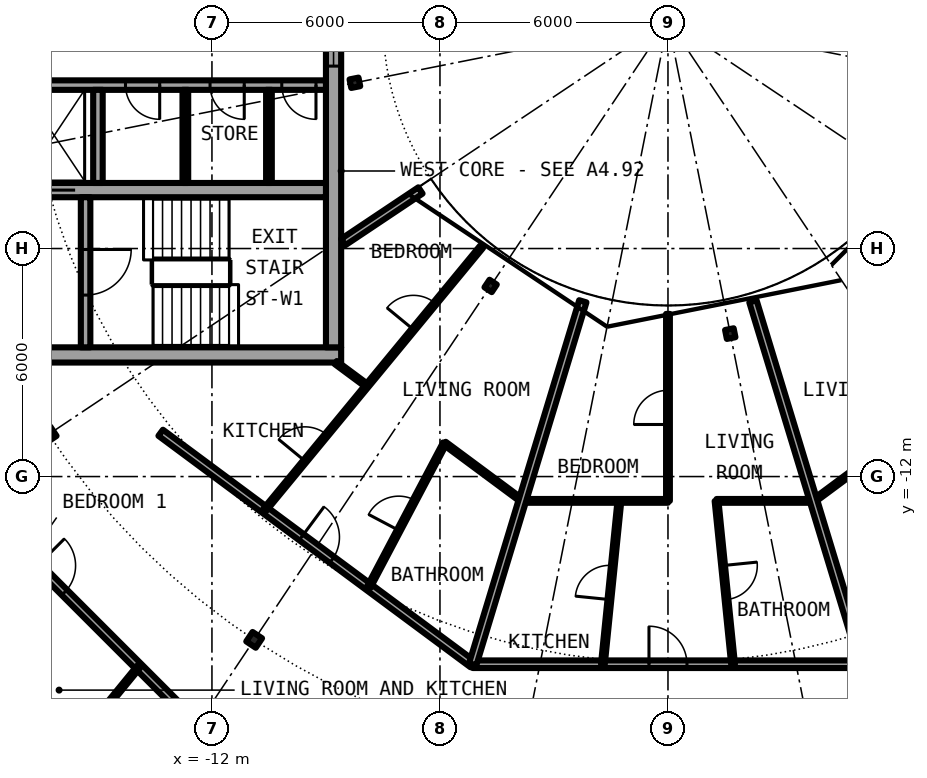
"""IFC4 building model, lengths in metres.
Left out: names, types, materials, properties, quantities, classifications, styles, units other than length and angle.
Written with IfcOpenShell. Run it as: python <this file> out.ifc"""

import sys

from ifc_helpers import new_model, si_unit, direction, frame, frame_2d, origin, origin_2d, place, context, subcontext, project, spatial, rectangle, i_section, extrude, element, fill, save


model = new_model("IFC4")
c1 = context("Model", 3, precision=1e-05, world=origin(), true_north=direction((0.0, 1.0)))
c2 = subcontext(c1, "Body", "Model", "MODEL_VIEW")
j1 = project(units=[si_unit("LENGTHUNIT", "METRE"), si_unit("PLANEANGLEUNIT", "RADIAN")], contexts=[c1])
p1 = place(None, origin())
s1 = spatial("IfcSite", under=j1, at=p1, CompositionType="ELEMENT")
p2 = place(p1, origin())
s2 = spatial("IfcBuilding", under=s1, at=p2, CompositionType="ELEMENT")
p3 = place(p2, frame((0.0, 0.0, 234.05)))
s3 = spatial("IfcBuildingStorey", under=s2, at=p3, CompositionType="ELEMENT", Elevation=234.05)
for number, where, z_axis, x_axis in (
    (1, (-16.297, -10.889, 0.0), (0.0, 0.0, 1.0), (-0.831, -0.556, 0.0)),
    (2, (-10.889, -16.297, 0.0), (0.0, 0.0, 1.0), (-0.556, -0.831, 0.0)),
):
    element("IfcColumn", number, at=place(p3, frame(where, z_axis=z_axis, x_axis=x_axis)), inside=s3, PredefinedType="COLUMN", context=c2, shape_type="SweptSolid", body=[
        extrude(i_section(OverallWidth=0.3, OverallDepth=0.3, WebThickness=0.011, FlangeThickness=0.019, FilletRadius=0.027, at=origin_2d()), origin(), (0.0, 0.0, 1.0), 3.05),
    ])
for number, where, z_axis, x_axis in (
    (3, (-8.239, -1.639, 0.0), (0.0, 0.0, 1.0), (-0.981, -0.195, 0.0)),
    (4, (-4.667, -6.984, 0.0), (0.0, 0.0, 1.0), (-0.556, -0.831, 0.0)),
    (5, (1.639, -8.239, 0.0), (0.0, 0.0, 1.0), (0.195, -0.981, 0.0)),
):
    element("IfcColumn", number, at=place(p3, frame(where, z_axis=z_axis, x_axis=x_axis)), inside=s3, PredefinedType="COLUMN", context=c2, shape_type="SweptSolid", body=[
        extrude(i_section(OverallWidth=0.24, OverallDepth=0.23, WebThickness=0.008, FlangeThickness=0.012, FilletRadius=0.021, at=origin_2d()), origin(), (0.0, 0.0, 1.0), 3.05),
    ])
p4 = place(p3, frame((-22.0, -8.8, 0.0), z_axis=(0.0, 0.0, 1.0), x_axis=(1.0, 0.0, 0.0)))
e6 = element("IfcWall", 6, at=p4, inside=s3, PredefinedType="SHEAR", context=c2, shape_type="SweptSolid", body=[
    extrude(rectangle(XDim=13.4, YDim=0.4, at=frame_2d((6.7, 0.0))), origin(), (0.0, 0.0, 1.0), 3.05),
])
p5 = place(p4, frame((0.925, 0.0, 0.0)))
e7 = element("IfcOpeningElement", 7, at=p5, cuts=e6, PredefinedType="OPENING", context=c2, shape_type="SweptSolid", body=[
    extrude(rectangle(XDim=1.2, YDim=2.3, at=frame_2d((0.6, 1.15))), frame((0.0, 0.21, 0.0), z_axis=(0.0, -1.0, 0.0), x_axis=(1.0, 0.0, 0.0)), (0.0, 0.0, 1.0), 0.42),
])
p6 = place(p3, frame((-8.8, 8.6, 0.0), z_axis=(0.0, 0.0, 1.0), x_axis=(0.0, -1.0, 0.0)))
e8 = element("IfcWall", 8, at=p6, inside=s3, PredefinedType="SHEAR", context=c2, shape_type="SweptSolid", body=[
    extrude(rectangle(XDim=17.2, YDim=0.4, at=frame_2d((8.6, 0.0))), origin(), (0.0, 0.0, 1.0), 3.05),
])
p7 = place(p6, frame((7.4, 0.0, 0.1)))
e9 = element("IfcOpeningElement", 9, at=p7, cuts=e8, PredefinedType="OPENING", context=c2, shape_type="SweptSolid", body=[
    extrude(rectangle(XDim=2.4, YDim=2.2, at=frame_2d((1.2, 1.1))), frame((0.0, 0.21, 0.0), z_axis=(0.0, -1.0, 0.0), x_axis=(1.0, 0.0, 0.0)), (0.0, 0.0, 1.0), 0.42),
])
p8 = place(p3, frame((-9.0, -1.7, 0.0), z_axis=(0.0, 0.0, 1.0), x_axis=(-1.0, 0.0, 0.0)))
e10 = element("IfcWall", 10, at=p8, inside=s3, PredefinedType="SHEAR", context=c2, shape_type="SweptSolid", body=[
    extrude(rectangle(XDim=10.15, YDim=0.25, at=frame_2d((5.075, 0.0))), origin(), (0.0, 0.0, 1.0), 3.05),
])
p9 = place(p8, frame((0.262, 0.0, 0.0)))
e11 = element("IfcOpeningElement", 11, at=p9, cuts=e10, PredefinedType="OPENING", context=c2, shape_type="SweptSolid", body=[
    extrude(rectangle(XDim=0.9, YDim=2.3, at=frame_2d((0.45, 1.15))), frame((0.0, 0.135, 0.0), z_axis=(0.0, -1.0, 0.0), x_axis=(1.0, 0.0, 0.0)), (0.0, 0.0, 1.0), 0.27),
])
p10 = place(p8, frame((2.15, 0.0, 0.0)))
e12 = element("IfcOpeningElement", 12, at=p10, cuts=e10, PredefinedType="OPENING", context=c2, shape_type="SweptSolid", body=[
    extrude(rectangle(XDim=0.9, YDim=2.3, at=frame_2d((0.45, 1.15))), frame((0.0, 0.135, 0.0), z_axis=(0.0, -1.0, 0.0), x_axis=(1.0, 0.0, 0.0)), (0.0, 0.0, 1.0), 0.27),
])
p11 = place(p8, frame((4.375, 0.0, 0.0)))
e13 = element("IfcOpeningElement", 13, at=p11, cuts=e10, PredefinedType="OPENING", context=c2, shape_type="SweptSolid", body=[
    extrude(rectangle(XDim=0.9, YDim=2.3, at=frame_2d((0.45, 1.15))), frame((0.0, 0.135, 0.0), z_axis=(0.0, -1.0, 0.0), x_axis=(1.0, 0.0, 0.0)), (0.0, 0.0, 1.0), 0.27),
])
p12 = place(p8, frame((8.837, 0.0, 0.0)))
e14 = element("IfcOpeningElement", 14, at=p12, cuts=e10, PredefinedType="OPENING", context=c2, shape_type="SweptSolid", body=[
    extrude(rectangle(XDim=0.9, YDim=2.3, at=frame_2d((0.45, 1.15))), frame((0.0, 0.135, 0.0), z_axis=(0.0, -1.0, 0.0), x_axis=(1.0, 0.0, 0.0)), (0.0, 0.0, 1.0), 0.27),
])
p13 = place(p3, frame((-9.0, -4.462, 0.0), z_axis=(0.0, 0.0, 1.0), x_axis=(-1.0, 0.0, 0.0)))
e15 = element("IfcWall", 15, at=p13, inside=s3, PredefinedType="SHEAR", context=c2, shape_type="SweptSolid", body=[
    extrude(rectangle(XDim=10.15, YDim=0.375, at=frame_2d((5.075, 0.0))), origin(), (0.0, 0.0, 1.0), 3.05),
])
p14 = place(p13, frame((6.6, 0.0, 0.0)))
e16 = element("IfcOpeningElement", 16, at=p14, cuts=e15, PredefinedType="OPENING", context=c2, shape_type="SweptSolid", body=[
    extrude(rectangle(XDim=1.1, YDim=2.3, at=frame_2d((0.55, 1.15))), frame((0.0, 0.198, 0.0), z_axis=(0.0, -1.0, 0.0), x_axis=(1.0, 0.0, 0.0)), (0.0, 0.0, 1.0), 0.395),
])
p15 = place(p3, frame((-15.325, -4.65, 0.0), z_axis=(0.0, 0.0, 1.0), x_axis=(0.0, -1.0, 0.0)))
e17 = element("IfcWall", 17, at=p15, inside=s3, PredefinedType="SHEAR", context=c2, shape_type="SweptSolid", body=[
    extrude(rectangle(XDim=3.95, YDim=0.25, at=frame_2d((1.975, 0.0))), origin(), (0.0, 0.0, 1.0), 3.05),
])
p16 = place(p15, frame((1.375, 0.0, 0.0)))
e18 = element("IfcOpeningElement", 18, at=p16, cuts=e17, PredefinedType="OPENING", context=c2, shape_type="SweptSolid", body=[
    extrude(rectangle(XDim=1.2, YDim=2.3, at=frame_2d((0.6, 1.15))), frame((0.0, 0.135, 0.0), z_axis=(0.0, -1.0, 0.0), x_axis=(1.0, 0.0, 0.0)), (0.0, 0.0, 1.0), 0.27),
])
p17 = place(p3, frame((-15.0, -1.825, 0.0), z_axis=(0.0, 0.0, 1.0), x_axis=(0.0, -1.0, 0.0)))
e19 = element("IfcWall", 19, at=p17, inside=s3, PredefinedType="SOLIDWALL", context=c2, shape_type="SweptSolid", body=[
    extrude(rectangle(XDim=2.45, YDim=0.25, at=frame_2d((1.225, 0.0))), origin(), (0.0, 0.0, 1.0), 2.7),
])
for number, where, z_axis, x_axis in (
    (20, (-10.5, -1.825, 0.0), (0.0, 0.0, 1.0), (0.0, -1.0, 0.0)),
    (21, (-12.7, -1.825, 0.0), (0.0, 0.0, 1.0), (0.0, -1.0, 0.0)),
):
    element("IfcWall", number, at=place(p3, frame(where, z_axis=z_axis, x_axis=x_axis)), inside=s3, PredefinedType="PARTITIONING", context=c2, shape_type="SweptSolid", body=[
        extrude(rectangle(XDim=2.45, YDim=0.15, at=frame_2d((1.225, 0.0))), origin(), (0.0, 0.0, 1.0), 2.7),
    ])
p18 = place(p3, frame((-18.542, -12.389, 0.0), z_axis=(0.0, 0.0, 1.0), x_axis=(0.707106781187, -0.707106781187, 0.0)))
e22 = element("IfcWall", 22, at=p18, inside=s3, PredefinedType="PARTITIONING", context=c2, shape_type="SweptSolid", body=[
    extrude(rectangle(XDim=8.702, YDim=0.2, at=frame_2d((4.351, 0.0))), origin(), (0.0, 0.0, 1.0), 2.7),
])
p19 = place(p18, frame((2.763, 0.0, 0.0)))
e23 = element("IfcOpeningElement", 23, at=p19, cuts=e22, PredefinedType="OPENING", context=c2, shape_type="SweptSolid", body=[
    extrude(rectangle(XDim=1.0, YDim=2.3, at=frame_2d((0.5, 1.15))), frame((0.0, 0.11, 0.0), z_axis=(0.0, -1.0, 0.0), x_axis=(1.0, 0.0, 0.0)), (0.0, 0.0, 1.0), 0.22),
])
p20 = place(p3, frame((-5.138, -16.938, 0.0), z_axis=(0.0, 0.0, 1.0), x_axis=(1.0, 0.0, 0.0)))
e24 = element("IfcWall", 24, at=p20, inside=s3, PredefinedType="PARTITIONING", context=c2, shape_type="SweptSolid", body=[
    extrude(rectangle(XDim=10.276, YDim=0.2, at=frame_2d((5.138, 0.0))), origin(), (0.0, 0.0, 1.0), 2.7),
])
p21 = place(p20, frame((4.638, 0.0, 0.0)))
e25 = element("IfcOpeningElement", 25, at=p21, cuts=e24, PredefinedType="OPENING", context=c2, shape_type="SweptSolid", body=[
    extrude(rectangle(XDim=1.0, YDim=2.3, at=frame_2d((0.5, 1.15))), frame((0.0, 0.11, 0.0), z_axis=(0.0, -1.0, 0.0), x_axis=(1.0, 0.0, 0.0)), (0.0, 0.0, 1.0), 0.22),
])
p22 = place(p3, frame((-13.349, -10.848, 0.0), z_axis=(0.0, 0.0, 1.0), x_axis=(0.803229232922, -0.595670042371, 0.0)))
e26 = element("IfcWall", 26, at=p22, inside=s3, PredefinedType="PARTITIONING", context=c2, shape_type="SweptSolid", body=[
    extrude(rectangle(XDim=10.224, YDim=0.2, at=frame_2d((5.112, 0.0))), origin(), (0.0, 0.0, 1.0), 2.7),
])
p23 = place(p22, frame((4.612, 0.0, 0.0)))
e27 = element("IfcOpeningElement", 27, at=p23, cuts=e26, PredefinedType="OPENING", context=c2, shape_type="SweptSolid", body=[
    extrude(rectangle(XDim=1.0, YDim=2.3, at=frame_2d((0.5, 1.15))), frame((0.0, 0.11, 0.0), z_axis=(0.0, -1.0, 0.0), x_axis=(1.0, 0.0, 0.0)), (0.0, 0.0, 1.0), 0.22),
])
p24 = place(p3, frame((-3.834, -12.64, 0.0), z_axis=(0.0, 0.0, 1.0), x_axis=(1.0, 0.0, 0.0)))
e28 = element("IfcWall", 28, at=p24, inside=s3, PredefinedType="PARTITIONING", context=c2, shape_type="SweptSolid", body=[
    extrude(rectangle(XDim=3.834, YDim=0.1, at=frame_2d((1.917, 0.0))), origin(), (0.0, 0.0, 1.0), 2.7),
])
p25 = place(p3, frame((1.278, -12.64, 0.0), z_axis=(0.0, 0.0, 1.0), x_axis=(1.0, 0.0, 0.0)))
e29 = element("IfcWall", 29, at=p25, inside=s3, PredefinedType="PARTITIONING", context=c2, shape_type="SweptSolid", body=[
    extrude(rectangle(XDim=2.556, YDim=0.1, at=frame_2d((1.278, 0.0))), origin(), (0.0, 0.0, 1.0), 2.7),
])
p26 = place(p3, frame((-8.743, -9.0, 0.0), z_axis=(0.0, 0.0, 1.0), x_axis=(0.80321556998, -0.595688465677, 0.0)))
e30 = element("IfcWall", 30, at=p26, inside=s3, PredefinedType="PARTITIONING", context=c2, shape_type="SweptSolid", body=[
    extrude(rectangle(XDim=1.026, YDim=0.1, at=frame_2d((0.513, 0.0))), origin(), (0.0, 0.0, 1.0), 2.7),
])
for number, where, z_axis, x_axis in (
    (31, (-5.877, -11.125, 0.0), (0.0, 0.0, 1.0), (0.803, -0.596, 0.0)),
    (32, (3.834, -12.64, 0.0), (0.0, 0.0, 1.0), (0.803, 0.596, 0.0)),
):
    element("IfcWall", number, at=place(p3, frame(where, z_axis=z_axis, x_axis=x_axis)), inside=s3, PredefinedType="PARTITIONING", context=c2, shape_type="SweptSolid", body=[
        extrude(rectangle(XDim=2.543, YDim=0.1, at=frame_2d((1.272, 0.0))), origin(), (0.0, 0.0, 1.0), 2.7),
    ])
p27 = place(p3, frame((-6.513, -4.472, 0.0), z_axis=(0.0, 0.0, 1.0), x_axis=(-0.831450132577, -0.555599385382, 0.0)))
e33 = element("IfcWall", 33, at=p27, inside=s3, PredefinedType="PARTITIONING", context=c2, shape_type="SweptSolid", body=[
    extrude(rectangle(XDim=2.443, YDim=0.2, at=frame_2d((1.221, 0.0))), origin(), (0.0, 0.0, 1.0), 2.7),
])
p28 = place(p3, frame((-14.927, -18.224, 0.0), z_axis=(0.0, 0.0, 1.0), x_axis=(0.633861186344, 0.773446828454, 0.0)))
e34 = element("IfcWall", 34, at=p28, inside=s3, PredefinedType="PARTITIONING", context=c2, shape_type="SweptSolid", body=[
    extrude(rectangle(XDim=1.578, YDim=0.1, at=frame_2d((0.789, 0.0))), origin(), (0.0, 0.0, 1.0), 2.7),
])
p29 = place(p3, frame((2.236, -7.39, 0.0), z_axis=(0.0, 0.0, 1.0), x_axis=(0.290580399904, -0.956850579344, 0.0)))
e35 = element("IfcWall", 35, at=p29, inside=s3, PredefinedType="PARTITIONING", context=c2, shape_type="SweptSolid", body=[
    extrude(rectangle(XDim=9.98, YDim=0.2, at=frame_2d((4.99, 0.0))), origin(), (0.0, 0.0, 1.0), 2.7),
])
p30 = place(p3, frame((-10.612, -12.878, 0.0), z_axis=(0.0, 0.0, 1.0), x_axis=(0.636115614725, 0.771593756262, 0.0)))
e36 = element("IfcWall", 36, at=p30, inside=s3, PredefinedType="PARTITIONING", context=c2, shape_type="SweptSolid", body=[
    extrude(rectangle(XDim=8.967, YDim=0.1, at=frame_2d((4.483, 0.0))), origin(), (0.0, 0.0, 1.0), 2.7),
])
p31 = place(p30, frame((1.667, 0.0, 0.0)))
e37 = element("IfcOpeningElement", 37, at=p31, cuts=e36, PredefinedType="OPENING", context=c2, shape_type="SweptSolid", body=[
    extrude(rectangle(XDim=0.9, YDim=2.3, at=frame_2d((0.45, 1.15))), frame((0.0, 0.06, 0.0), z_axis=(0.0, -1.0, 0.0), x_axis=(1.0, 0.0, 0.0)), (0.0, 0.0, 1.0), 0.12),
])
p32 = place(p30, frame((6.151, 0.0, 0.0)))
e38 = element("IfcOpeningElement", 38, at=p32, cuts=e36, PredefinedType="OPENING", context=c2, shape_type="SweptSolid", body=[
    extrude(rectangle(XDim=0.9, YDim=2.3, at=frame_2d((0.45, 1.15))), frame((0.0, 0.06, 0.0), z_axis=(0.0, -1.0, 0.0), x_axis=(1.0, 0.0, 0.0)), (0.0, 0.0, 1.0), 0.12),
])
p33 = place(p3, frame((-7.873, -14.909, 0.0), z_axis=(0.0, 0.0, 1.0), x_axis=(0.467030118529, 0.884241408432, 0.0)))
e39 = element("IfcWall", 39, at=p33, inside=s3, PredefinedType="PARTITIONING", context=c2, shape_type="SweptSolid", body=[
    extrude(rectangle(XDim=4.278, YDim=0.1, at=frame_2d((2.139, 0.0))), origin(), (0.0, 0.0, 1.0), 2.7),
])
p34 = place(p33, frame((1.689, 0.0, 0.0)))
e40 = element("IfcOpeningElement", 40, at=p34, cuts=e39, PredefinedType="OPENING", context=c2, shape_type="SweptSolid", body=[
    extrude(rectangle(XDim=0.9, YDim=2.3, at=frame_2d((0.45, 1.15))), frame((0.0, 0.06, 0.0), z_axis=(0.0, -1.0, 0.0), x_axis=(1.0, 0.0, 0.0)), (0.0, 0.0, 1.0), 0.12),
])
p35 = place(p3, frame((-5.138, -16.938, 0.0), z_axis=(0.0, 0.0, 1.0), x_axis=(0.290284403441, 0.956940418793, 0.0)))
e41 = element("IfcWall", 41, at=p35, inside=s3, PredefinedType="PARTITIONING", context=c2, shape_type="SweptSolid", body=[
    extrude(rectangle(XDim=9.98, YDim=0.2, at=frame_2d((4.99, 0.0))), origin(), (0.0, 0.0, 1.0), 2.7),
])
p36 = place(p3, frame((-1.713, -16.938, 0.0), z_axis=(0.0, 0.0, 1.0), x_axis=(0.100650711003, 0.994921823248, 0.0)))
e42 = element("IfcWall", 42, at=p36, inside=s3, PredefinedType="PARTITIONING", context=c2, shape_type="SweptSolid", body=[
    extrude(rectangle(XDim=4.32, YDim=0.1, at=frame_2d((2.16, 0.0))), origin(), (0.0, 0.0, 1.0), 2.7),
])
p37 = place(p36, frame((1.71, 0.0, 0.0)))
e43 = element("IfcOpeningElement", 43, at=p37, cuts=e42, PredefinedType="OPENING", context=c2, shape_type="SweptSolid", body=[
    extrude(rectangle(XDim=0.9, YDim=2.3, at=frame_2d((0.45, 1.15))), frame((0.0, 0.06, 0.0), z_axis=(0.0, -1.0, 0.0), x_axis=(1.0, 0.0, 0.0)), (0.0, 0.0, 1.0), 0.12),
])
p38 = place(p3, frame((0.0, -12.64, 0.0), z_axis=(0.0, 0.0, 1.0), x_axis=(0.0, 1.0, 0.0)))
e44 = element("IfcWall", 44, at=p38, inside=s3, PredefinedType="PARTITIONING", context=c2, shape_type="SweptSolid", body=[
    extrude(rectangle(XDim=4.92, YDim=0.1, at=frame_2d((2.46, 0.0))), origin(), (0.0, 0.0, 1.0), 2.7),
])
p39 = place(p38, frame((2.01, 0.0, 0.0)))
e45 = element("IfcOpeningElement", 45, at=p39, cuts=e44, PredefinedType="OPENING", context=c2, shape_type="SweptSolid", body=[
    extrude(rectangle(XDim=0.9, YDim=2.3, at=frame_2d((0.45, 1.15))), frame((0.0, 0.06, 0.0), z_axis=(0.0, -1.0, 0.0), x_axis=(1.0, 0.0, 0.0)), (0.0, 0.0, 1.0), 0.12),
])
p40 = place(p3, frame((1.278, -12.64, 0.0), z_axis=(0.0, 0.0, 1.0), x_axis=(0.100650711003, -0.994921823248, 0.0)))
e46 = element("IfcWall", 46, at=p40, inside=s3, PredefinedType="PARTITIONING", context=c2, shape_type="SweptSolid", body=[
    extrude(rectangle(XDim=4.32, YDim=0.1, at=frame_2d((2.16, 0.0))), origin(), (0.0, 0.0, 1.0), 2.7),
])
p41 = place(p40, frame((1.71, 0.0, 0.0)))
e47 = element("IfcOpeningElement", 47, at=p41, cuts=e46, PredefinedType="OPENING", context=c2, shape_type="SweptSolid", body=[
    extrude(rectangle(XDim=0.9, YDim=2.3, at=frame_2d((0.45, 1.15))), frame((0.0, 0.06, 0.0), z_axis=(0.0, -1.0, 0.0), x_axis=(1.0, 0.0, 0.0)), (0.0, 0.0, 1.0), 0.12),
])
p42 = place(p14, origin())
e48 = element("IfcDoor", 48, at=p42, inside=s3, OperationType="DOUBLE_DOOR_SLIDING", PredefinedType="DOOR", context=c2, shape_type="SweptSolid", body=[
    extrude(rectangle(XDim=1.1, YDim=2.3, at=frame_2d((0.55, 1.15))), frame((0.0, 0.025, 0.0), z_axis=(0.0, -1.0, 0.0), x_axis=(1.0, 0.0, 0.0)), (0.0, 0.0, 1.0), 0.05),
])
fill(e16, e48)
p43 = place(p9, origin())
e49 = element("IfcDoor", 49, at=p43, inside=s3, OperationType="SINGLE_SWING_RIGHT", PredefinedType="DOOR", context=c2, shape_type="SweptSolid", body=[
    extrude(rectangle(XDim=0.9, YDim=2.3, at=frame_2d((0.45, 1.15))), frame((0.0, 0.025, 0.0), z_axis=(0.0, -1.0, 0.0), x_axis=(1.0, 0.0, 0.0)), (0.0, 0.0, 1.0), 0.05),
])
fill(e11, e49)
p44 = place(p10, origin())
e50 = element("IfcDoor", 50, at=p44, inside=s3, OperationType="SINGLE_SWING_RIGHT", PredefinedType="DOOR", context=c2, shape_type="SweptSolid", body=[
    extrude(rectangle(XDim=0.9, YDim=2.3, at=frame_2d((0.45, 1.15))), frame((0.0, 0.025, 0.0), z_axis=(0.0, -1.0, 0.0), x_axis=(1.0, 0.0, 0.0)), (0.0, 0.0, 1.0), 0.05),
])
fill(e12, e50)
p45 = place(p11, origin())
e51 = element("IfcDoor", 51, at=p45, inside=s3, OperationType="SINGLE_SWING_RIGHT", PredefinedType="DOOR", context=c2, shape_type="SweptSolid", body=[
    extrude(rectangle(XDim=0.9, YDim=2.3, at=frame_2d((0.45, 1.15))), frame((0.0, 0.025, 0.0), z_axis=(0.0, -1.0, 0.0), x_axis=(1.0, 0.0, 0.0)), (0.0, 0.0, 1.0), 0.05),
])
fill(e13, e51)
p46 = place(p16, origin())
e52 = element("IfcDoor", 52, at=p46, inside=s3, OperationType="SINGLE_SWING_LEFT", PredefinedType="DOOR", context=c2, shape_type="SweptSolid", body=[
    extrude(rectangle(XDim=1.2, YDim=2.3, at=frame_2d((0.6, 1.15))), frame((0.0, 0.025, 0.0), z_axis=(0.0, -1.0, 0.0), x_axis=(1.0, 0.0, 0.0)), (0.0, 0.0, 1.0), 0.05),
])
fill(e18, e52)
p47 = place(p7, origin())
e53 = element("IfcWindow", 53, at=p47, inside=s3, PartitioningType="SINGLE_PANEL", PredefinedType="WINDOW", context=c2, shape_type="SweptSolid", body=[
    extrude(rectangle(XDim=2.4, YDim=2.2, at=frame_2d((1.2, 1.1))), frame((0.0, 0.03, 0.0), z_axis=(0.0, -1.0, 0.0), x_axis=(1.0, 0.0, 0.0)), (0.0, 0.0, 1.0), 0.06),
])
fill(e9, e53)
p48 = place(p19, origin())
e54 = element("IfcDoor", 54, at=p48, inside=s3, OperationType="SINGLE_SWING_LEFT", PredefinedType="DOOR", context=c2, shape_type="SweptSolid", body=[
    extrude(rectangle(XDim=1.0, YDim=2.3, at=frame_2d((0.5, 1.15))), frame((0.0, 0.025, 0.0), z_axis=(0.0, -1.0, 0.0), x_axis=(1.0, 0.0, 0.0)), (0.0, 0.0, 1.0), 0.05),
])
fill(e23, e54)
p49 = place(p23, origin())
e55 = element("IfcDoor", 55, at=p49, inside=s3, OperationType="SINGLE_SWING_LEFT", PredefinedType="DOOR", context=c2, shape_type="SweptSolid", body=[
    extrude(rectangle(XDim=1.0, YDim=2.3, at=frame_2d((0.5, 1.15))), frame((0.0, 0.025, 0.0), z_axis=(0.0, -1.0, 0.0), x_axis=(1.0, 0.0, 0.0)), (0.0, 0.0, 1.0), 0.05),
])
fill(e27, e55)
p50 = place(p34, origin())
e56 = element("IfcDoor", 56, at=p50, inside=s3, OperationType="SINGLE_SWING_LEFT", PredefinedType="DOOR", context=c2, shape_type="SweptSolid", body=[
    extrude(rectangle(XDim=0.9, YDim=2.3, at=frame_2d((0.45, 1.15))), frame((0.0, 0.025, 0.0), z_axis=(0.0, -1.0, 0.0), x_axis=(1.0, 0.0, 0.0)), (0.0, 0.0, 1.0), 0.05),
])
fill(e40, e56)
p51 = place(p31, origin())
e57 = element("IfcDoor", 57, at=p51, inside=s3, OperationType="SINGLE_SWING_LEFT", PredefinedType="DOOR", context=c2, shape_type="SweptSolid", body=[
    extrude(rectangle(XDim=0.9, YDim=2.3, at=frame_2d((0.45, 1.15))), frame((0.0, 0.025, 0.0), z_axis=(0.0, -1.0, 0.0), x_axis=(1.0, 0.0, 0.0)), (0.0, 0.0, 1.0), 0.05),
])
fill(e37, e57)
p52 = place(p32, origin())
e58 = element("IfcDoor", 58, at=p52, inside=s3, OperationType="SINGLE_SWING_RIGHT", PredefinedType="DOOR", context=c2, shape_type="SweptSolid", body=[
    extrude(rectangle(XDim=0.9, YDim=2.3, at=frame_2d((0.45, 1.15))), frame((0.0, 0.025, 0.0), z_axis=(0.0, -1.0, 0.0), x_axis=(1.0, 0.0, 0.0)), (0.0, 0.0, 1.0), 0.05),
])
fill(e38, e58)
p53 = place(p21, origin())
e59 = element("IfcDoor", 59, at=p53, inside=s3, OperationType="SINGLE_SWING_LEFT", PredefinedType="DOOR", context=c2, shape_type="SweptSolid", body=[
    extrude(rectangle(XDim=1.0, YDim=2.3, at=frame_2d((0.5, 1.15))), frame((0.0, 0.025, 0.0), z_axis=(0.0, -1.0, 0.0), x_axis=(1.0, 0.0, 0.0)), (0.0, 0.0, 1.0), 0.05),
])
fill(e25, e59)
p54 = place(p41, origin())
e60 = element("IfcDoor", 60, at=p54, inside=s3, OperationType="SINGLE_SWING_RIGHT", PredefinedType="DOOR", context=c2, shape_type="SweptSolid", body=[
    extrude(rectangle(XDim=0.9, YDim=2.3, at=frame_2d((0.45, 1.15))), frame((0.0, 0.025, 0.0), z_axis=(0.0, -1.0, 0.0), x_axis=(1.0, 0.0, 0.0)), (0.0, 0.0, 1.0), 0.05),
])
fill(e47, e60)
p55 = place(p37, origin())
e61 = element("IfcDoor", 61, at=p55, inside=s3, OperationType="SINGLE_SWING_LEFT", PredefinedType="DOOR", context=c2, shape_type="SweptSolid", body=[
    extrude(rectangle(XDim=0.9, YDim=2.3, at=frame_2d((0.45, 1.15))), frame((0.0, 0.025, 0.0), z_axis=(0.0, -1.0, 0.0), x_axis=(1.0, 0.0, 0.0)), (0.0, 0.0, 1.0), 0.05),
])
fill(e43, e61)
p56 = place(p39, origin())
e62 = element("IfcDoor", 62, at=p56, inside=s3, OperationType="SINGLE_SWING_RIGHT", PredefinedType="DOOR", context=c2, shape_type="SweptSolid", body=[
    extrude(rectangle(XDim=0.9, YDim=2.3, at=frame_2d((0.45, 1.15))), frame((0.0, 0.025, 0.0), z_axis=(0.0, -1.0, 0.0), x_axis=(1.0, 0.0, 0.0)), (0.0, 0.0, 1.0), 0.05),
])
fill(e45, e62)
save(model, sys.argv[1])
